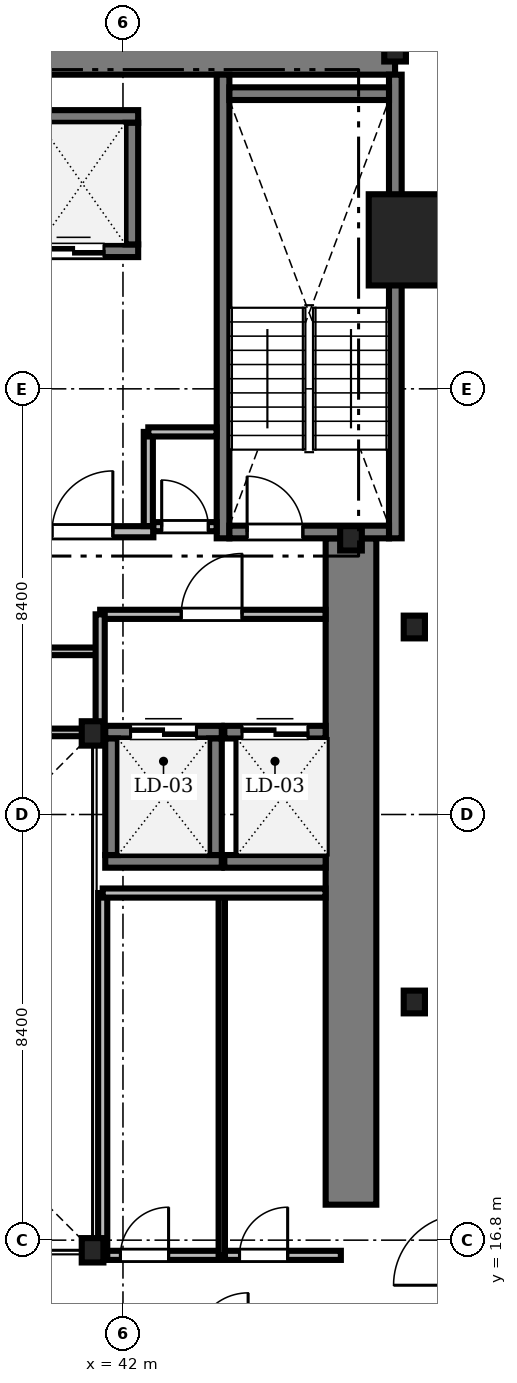
"""IFC4 building model, lengths in metres.
Left out: names, types, materials, properties, quantities, classifications, styles, units other than length and angle.
Written with IfcOpenShell. Run it as: python <this file> out.ifc"""

import sys

from ifc_helpers import new_model, si_unit, direction, frame, frame_2d, origin, origin_2d, place, context, subcontext, project, spatial, rectangle, i_section, extrude, source, transform, mapped, element, fill, save


model = new_model("IFC4")
c1 = context("Model", 3, precision=1e-05, world=origin(), true_north=direction((0.0, 1.0)))
c2 = subcontext(c1, "Body", "Model", "MODEL_VIEW")
j1 = project(units=[si_unit("LENGTHUNIT", "METRE"), si_unit("PLANEANGLEUNIT", "RADIAN")], contexts=[c1])
p1 = place(None, origin())
s1 = spatial("IfcSite", under=j1, at=p1, CompositionType="ELEMENT")
p2 = place(p1, origin())
s2 = spatial("IfcBuilding", under=s1, at=p2, CompositionType="ELEMENT")
p3 = place(p2, frame((0.0, 0.0, 67.75)))
s3 = spatial("IfcBuildingStorey", under=s2, at=p3, CompositionType="ELEMENT", Elevation=67.75)
m1 = source(origin(), c2, "Body", "SweptSolid", [
    extrude(rectangle(XDim=17.52, YDim=1.0, at=frame_2d((8.76, 0.0))), origin(), (0.0, 0.0, 1.0), 3.41),
])
p4 = place(p3, frame((29.85, 40.3, 0.0), z_axis=(0.0, 0.0, 1.0), x_axis=(1.0, 0.0, 0.0)))
e1 = element("IfcWall", 1, at=p4, inside=s3, PredefinedType="SHEAR", context=c2, shape_type="MappedRepresentation", body=[
    mapped(m1, transform((0.0, 0.0, 0.0), scale=1.0)),
])
m2 = source(origin(), c2, "Body", "SweptSolid", [
    extrude(rectangle(XDim=13.15, YDim=1.0, at=frame_2d((6.575, 0.0))), origin(), (0.0, 0.0, 1.0), 3.41),
])
p5 = place(p3, frame((46.5, 17.5, 0.0), z_axis=(0.0, 0.0, 1.0), x_axis=(0.0, 1.0, 0.0)))
e2 = element("IfcWall", 2, at=p5, inside=s3, PredefinedType="SHEAR", context=c2, shape_type="MappedRepresentation", body=[
    mapped(m2, transform((0.0, 0.0, 0.0), scale=1.0)),
])
m3 = source(origin(), c2, "Body", "SweptSolid", [
    extrude(i_section(OverallWidth=0.428, OverallDepth=0.481, WebThickness=0.04, FlangeThickness=0.063, FilletRadius=0.015, at=origin_2d()), origin(), (0.0, 0.0, 1.0), 3.41),
])
for number, where, z_axis, x_axis in (
    (3, (41.4, 16.6, 0.0), (0.0, 0.0, 1.0), (1.0, 0.0, 0.0)),
    (4, (41.4, 26.8, 0.0), (0.0, 0.0, 1.0), (1.0, 0.0, 0.0)),
    (5, (46.5, 30.65, 0.0), (0.0, 0.0, 1.0), (1.0, 0.0, 0.0)),
    (6, (47.37, 40.3, 0.0), (0.0, 0.0, 1.0), (1.0, 0.0, 0.0)),
):
    element("IfcColumn", number, at=place(p3, frame(where, z_axis=z_axis, x_axis=x_axis)), inside=s3, PredefinedType="COLUMN", context=c2, shape_type="MappedRepresentation", body=[
        mapped(m3, transform((0.0, 0.0, 0.0), scale=1.0)),
    ])
m4 = source(origin(), c2, "Body", "SweptSolid", [
    extrude(rectangle(XDim=1.8, YDim=1.8, at=origin_2d()), origin(), (0.0, 0.0, 1.0), 3.41),
])
p6 = place(p3, frame((47.75, 36.54, 0.0), z_axis=(0.0, 0.0, 1.0), x_axis=(1.0, 0.0, 0.0)))
e7 = element("IfcColumn", 7, at=p6, inside=s3, PredefinedType="COLUMN", context=c2, shape_type="MappedRepresentation", body=[
    mapped(m4, transform((0.0, 0.0, 0.0), scale=1.0)),
])
m5 = source(origin(), c2, "Body", "SweptSolid", [
    extrude(i_section(OverallWidth=0.419, OverallDepth=0.449, WebThickness=0.031, FlangeThickness=0.048, FilletRadius=0.015, at=origin_2d()), origin(), (0.0, 0.0, 1.0), 3.41),
])
for number, where, z_axis, x_axis in (
    (8, (47.75, 21.5, 0.0), (0.0, 0.0, 1.0), (1.0, 0.0, 0.0)),
    (9, (47.75, 28.9, 0.0), (0.0, 0.0, 1.0), (1.0, 0.0, 0.0)),
):
    element("IfcColumn", number, at=place(p3, frame(where, z_axis=z_axis, x_axis=x_axis)), inside=s3, PredefinedType="COLUMN", context=c2, shape_type="MappedRepresentation", body=[
        mapped(m5, transform((0.0, 0.0, 0.0), scale=1.0)),
    ])
m6 = source(origin(), c2, "Body", "SweptSolid", [
    extrude(rectangle(XDim=9.15, YDim=0.25, at=frame_2d((4.575, 0.0))), origin(), (0.0, 0.0, 1.0), 3.45),
])
for number, where, z_axis, x_axis in (
    (10, (43.975, 30.65, 0.0), (0.0, 0.0, 1.0), (0.0, 1.0, 0.0)),
    (11, (47.375, 30.65, 0.0), (0.0, 0.0, 1.0), (0.0, 1.0, 0.0)),
):
    element("IfcWall", number, at=place(p3, frame(where, z_axis=z_axis, x_axis=x_axis)), inside=s3, PredefinedType="SOLIDWALL", context=c2, shape_type="MappedRepresentation", body=[
        mapped(m6, transform((0.0, 0.0, 0.0), scale=1.0)),
    ])
m7 = source(origin(), c2, "Body", "SweptSolid", [
    extrude(rectangle(XDim=3.15, YDim=0.25, at=frame_2d((1.575, 0.0))), origin(), (0.0, 0.0, 1.0), 3.45),
])
p7 = place(p3, frame((44.1, 39.425, 0.0), z_axis=(0.0, 0.0, 1.0), x_axis=(1.0, 0.0, 0.0)))
e12 = element("IfcWall", 12, at=p7, inside=s3, PredefinedType="SOLIDWALL", context=c2, shape_type="MappedRepresentation", body=[
    mapped(m7, transform((0.0, 0.0, 0.0), scale=1.0)),
])
p8 = place(p3, frame((44.1, 30.775, 0.0), z_axis=(0.0, 0.0, 1.0), x_axis=(1.0, 0.0, 0.0)))
e13 = element("IfcWall", 13, at=p8, inside=s3, PredefinedType="SOLIDWALL", context=c2, shape_type="MappedRepresentation", body=[
    mapped(m7, transform((0.0, 0.0, 0.0), scale=1.0)),
])
m8 = source(origin(), c2, "Body", "SweptSolid", [
    extrude(rectangle(XDim=1.1, YDim=2.2, at=frame_2d((0.55, 1.1))), frame((0.0, 0.135, 0.0), z_axis=(0.0, -1.0, 0.0), x_axis=(1.0, 0.0, 0.0)), (0.0, 0.0, 1.0), 0.27),
])
p9 = place(p8, frame((0.35, 0.0, 0.0)))
e14 = element("IfcOpeningElement", 14, at=p9, cuts=e13, PredefinedType="OPENING", context=c2, shape_type="MappedRepresentation", body=[
    mapped(m8, transform((0.0, 0.0, 0.0), scale=1.0)),
])
m9 = source(origin(), c2, "Body", "SweptSolid", [
    extrude(rectangle(XDim=2.8, YDim=0.22, at=frame_2d((1.4, 0.0))), origin(), (0.0, 0.0, 1.0), 3.41),
])
p10 = place(p3, frame((39.8, 30.78, 0.0), z_axis=(0.0, 0.0, 1.0), x_axis=(1.0, 0.0, 0.0)))
e15 = element("IfcWall", 15, at=p10, inside=s3, PredefinedType="SOLIDWALL", context=c2, shape_type="MappedRepresentation", body=[
    mapped(m9, transform((0.0, 0.0, 0.0), scale=1.0)),
])
m10 = source(origin(), c2, "Body", "SweptSolid", [
    extrude(rectangle(XDim=1.2, YDim=2.2, at=frame_2d((0.6, 1.1))), frame((0.0, 0.12, 0.0), z_axis=(0.0, -1.0, 0.0), x_axis=(1.0, 0.0, 0.0)), (0.0, 0.0, 1.0), 0.24),
])
p11 = place(p10, frame((0.8, 0.0, 0.0)))
e16 = element("IfcOpeningElement", 16, at=p11, cuts=e15, PredefinedType="OPENING", context=c2, shape_type="MappedRepresentation", body=[
    mapped(m10, transform((0.0, 0.0, 0.0), scale=1.0)),
])
m11 = source(origin(), c2, "Body", "SweptSolid", [
    extrude(rectangle(XDim=2.55, YDim=0.25, at=frame_2d((1.275, 0.0))), origin(), (0.0, 0.0, 1.0), 3.41),
])
p12 = place(p3, frame((39.75, 36.325, 0.0), z_axis=(0.0, 0.0, 1.0), x_axis=(1.0, 0.0, 0.0)))
e17 = element("IfcWall", 17, at=p12, inside=s3, PredefinedType="SOLIDWALL", context=c2, shape_type="MappedRepresentation", body=[
    mapped(m11, transform((0.0, 0.0, 0.0), scale=1.0)),
])
m12 = source(origin(), c2, "Body", "SweptSolid", [
    extrude(rectangle(XDim=1.2, YDim=2.25, at=frame_2d((0.6, 1.125))), frame((0.0, 0.135, 0.0), z_axis=(0.0, -1.0, 0.0), x_axis=(1.0, 0.0, 0.0)), (0.0, 0.0, 1.0), 0.27),
])
p13 = place(p12, frame((0.675, 0.0, 0.0)))
e18 = element("IfcOpeningElement", 18, at=p13, cuts=e17, PredefinedType="OPENING", context=c2, shape_type="MappedRepresentation", body=[
    mapped(m12, transform((0.0, 0.0, 0.0), scale=1.0)),
])
p14 = place(p3, frame((39.75, 38.975, 0.0), z_axis=(0.0, 0.0, 1.0), x_axis=(1.0, 0.0, 0.0)))
e19 = element("IfcWall", 19, at=p14, inside=s3, PredefinedType="SOLIDWALL", context=c2, shape_type="MappedRepresentation", body=[
    mapped(m11, transform((0.0, 0.0, 0.0), scale=1.0)),
])
m13 = source(origin(), c2, "Body", "SweptSolid", [
    extrude(rectangle(XDim=2.4, YDim=0.25, at=frame_2d((1.2, 0.0))), origin(), (0.0, 0.0, 1.0), 3.41),
])
p15 = place(p3, frame((42.175, 36.45, 0.0), z_axis=(0.0, 0.0, 1.0), x_axis=(0.0, 1.0, 0.0)))
e20 = element("IfcWall", 20, at=p15, inside=s3, PredefinedType="SOLIDWALL", context=c2, shape_type="MappedRepresentation", body=[
    mapped(m13, transform((0.0, 0.0, 0.0), scale=1.0)),
])
m14 = source(origin(), c2, "Body", "SweptSolid", [
    extrude(rectangle(XDim=2.3, YDim=0.25, at=frame_2d((1.15, 0.0))), origin(), (0.0, 0.0, 1.0), 3.41),
])
p16 = place(p3, frame((41.65, 24.275, 0.0), z_axis=(0.0, 0.0, 1.0), x_axis=(1.0, 0.0, 0.0)))
e21 = element("IfcWall", 21, at=p16, inside=s3, PredefinedType="SOLIDWALL", context=c2, shape_type="MappedRepresentation", body=[
    mapped(m14, transform((0.0, 0.0, 0.0), scale=1.0)),
])
p17 = place(p3, frame((41.65, 26.825, 0.0), z_axis=(0.0, 0.0, 1.0), x_axis=(1.0, 0.0, 0.0)))
e22 = element("IfcWall", 22, at=p17, inside=s3, PredefinedType="SOLIDWALL", context=c2, shape_type="MappedRepresentation", body=[
    mapped(m14, transform((0.0, 0.0, 0.0), scale=1.0)),
])
m15 = source(origin(), c2, "Body", "SweptSolid", [
    extrude(rectangle(XDim=1.3, YDim=2.3, at=frame_2d((0.65, 1.15))), frame((0.0, 0.135, 0.0), z_axis=(0.0, -1.0, 0.0), x_axis=(1.0, 0.0, 0.0)), (0.0, 0.0, 1.0), 0.27),
])
p18 = place(p17, frame((0.5, 0.0, 0.0)))
e23 = element("IfcOpeningElement", 23, at=p18, cuts=e22, PredefinedType="OPENING", context=c2, shape_type="MappedRepresentation", body=[
    mapped(m15, transform((0.0, 0.0, 0.0), scale=1.0)),
])
for number, where, z_axis, x_axis in (
    (24, (41.775, 24.4, 0.0), (0.0, 0.0, 1.0), (0.0, 1.0, 0.0)),
    (25, (43.825, 24.4, 0.0), (0.0, 0.0, 1.0), (0.0, 1.0, 0.0)),
):
    element("IfcWall", number, at=place(p3, frame(where, z_axis=z_axis, x_axis=x_axis)), inside=s3, PredefinedType="SOLIDWALL", context=c2, shape_type="MappedRepresentation", body=[
        mapped(m14, transform((0.0, 0.0, 0.0), scale=1.0)),
    ])
m16 = source(origin(), c2, "Body", "SweptSolid", [
    extrude(rectangle(XDim=2.0, YDim=0.25, at=frame_2d((1.0, 0.0))), origin(), (0.0, 0.0, 1.0), 3.41),
])
p19 = place(p3, frame((44.0, 24.275, 0.0), z_axis=(0.0, 0.0, 1.0), x_axis=(1.0, 0.0, 0.0)))
e26 = element("IfcWall", 26, at=p19, inside=s3, PredefinedType="SOLIDWALL", context=c2, shape_type="MappedRepresentation", body=[
    mapped(m16, transform((0.0, 0.0, 0.0), scale=1.0)),
])
p20 = place(p3, frame((44.0, 26.825, 0.0), z_axis=(0.0, 0.0, 1.0), x_axis=(1.0, 0.0, 0.0)))
e27 = element("IfcWall", 27, at=p20, inside=s3, PredefinedType="SOLIDWALL", context=c2, shape_type="MappedRepresentation", body=[
    mapped(m16, transform((0.0, 0.0, 0.0), scale=1.0)),
])
p21 = place(p20, frame((0.35, 0.0, 0.0)))
e28 = element("IfcOpeningElement", 28, at=p21, cuts=e27, PredefinedType="OPENING", context=c2, shape_type="MappedRepresentation", body=[
    mapped(m15, transform((0.0, 0.0, 0.0), scale=1.0)),
])
m17 = source(origin(), c2, "Body", "SweptSolid", [
    extrude(rectangle(XDim=4.448, YDim=0.18, at=frame_2d((2.224, 0.0))), origin(), (0.0, 0.0, 1.0), 3.042),
])
p22 = place(p3, frame((41.55, 29.15, 0.0), z_axis=(0.0, 0.0, 1.0), x_axis=(1.0, 0.0, 0.0)))
e29 = element("IfcWall", 29, at=p22, inside=s3, PredefinedType="PARTITIONING", context=c2, shape_type="MappedRepresentation", body=[
    mapped(m17, transform((0.0, 0.0, 0.0), scale=1.0)),
])
m18 = source(origin(), c2, "Body", "SweptSolid", [
    extrude(rectangle(XDim=1.2, YDim=2.2, at=frame_2d((0.6, 1.1))), frame((0.0, 0.1, 0.0), z_axis=(0.0, -1.0, 0.0), x_axis=(1.0, 0.0, 0.0)), (0.0, 0.0, 1.0), 0.2),
])
p23 = place(p22, frame((1.6, 0.0, 0.0)))
e30 = element("IfcOpeningElement", 30, at=p23, cuts=e29, PredefinedType="OPENING", context=c2, shape_type="MappedRepresentation", body=[
    mapped(m18, transform((0.0, 0.0, 0.0), scale=1.0)),
])
m19 = source(origin(), c2, "Body", "SweptSolid", [
    extrude(rectangle(XDim=4.7, YDim=0.18, at=frame_2d((2.35, 0.0))), origin(), (0.0, 0.0, 1.0), 2.802),
])
p24 = place(p3, frame((41.6, 16.5, 0.0), z_axis=(0.0, 0.0, 1.0), x_axis=(1.0, 0.0, 0.0)))
e31 = element("IfcWall", 31, at=p24, inside=s3, PredefinedType="PARTITIONING", context=c2, shape_type="MappedRepresentation", body=[
    mapped(m19, transform((0.0, 0.0, 0.0), scale=1.0)),
])
m20 = source(origin(), c2, "Body", "SweptSolid", [
    extrude(rectangle(XDim=0.95, YDim=2.15, at=frame_2d((0.475, 1.075))), frame((0.0, 0.1, 0.0), z_axis=(0.0, -1.0, 0.0), x_axis=(1.0, 0.0, 0.0)), (0.0, 0.0, 1.0), 0.2),
])
p25 = place(p24, frame((0.35, 0.0, 0.0)))
e32 = element("IfcOpeningElement", 32, at=p25, cuts=e31, PredefinedType="OPENING", context=c2, shape_type="MappedRepresentation", body=[
    mapped(m20, transform((0.0, 0.0, 0.0), scale=1.0)),
])
p26 = place(p24, frame((2.7, 0.0, 0.0)))
e33 = element("IfcOpeningElement", 33, at=p26, cuts=e31, PredefinedType="OPENING", context=c2, shape_type="MappedRepresentation", body=[
    mapped(m20, transform((0.0, 0.0, 0.0), scale=1.0)),
])
m21 = source(origin(), c2, "Body", "SweptSolid", [
    extrude(rectangle(XDim=3.0, YDim=0.15, at=frame_2d((1.5, 0.0))), origin(), (0.0, 0.0, 1.0), 3.41),
])
p27 = place(p3, frame((38.52, 28.42, 0.0), z_axis=(0.0, 0.0, 1.0), x_axis=(1.0, 0.0, 0.0)))
e34 = element("IfcWall", 34, at=p27, inside=s3, PredefinedType="PARTITIONING", context=c2, shape_type="MappedRepresentation", body=[
    mapped(m21, transform((0.0, 0.0, 0.0), scale=1.0)),
])
m22 = source(origin(), c2, "Body", "SweptSolid", [
    extrude(rectangle(XDim=0.92, YDim=2.1, at=frame_2d((0.46, 1.05))), frame((0.0, 0.085, 0.0), z_axis=(0.0, -1.0, 0.0), x_axis=(1.0, 0.0, 0.0)), (0.0, 0.0, 1.0), 0.17),
])
p28 = place(p27, frame((0.83, 0.0, 0.0)))
e35 = element("IfcOpeningElement", 35, at=p28, cuts=e34, PredefinedType="OPENING", context=c2, shape_type="MappedRepresentation", body=[
    mapped(m22, transform((0.0, 0.0, 0.0), scale=1.0)),
])
m23 = source(origin(), c2, "Body", "SweptSolid", [
    extrude(rectangle(XDim=1.248, YDim=0.18, at=frame_2d((0.624, 0.0))), origin(), (0.0, 0.0, 1.0), 3.41),
])
p29 = place(p3, frame((42.6, 30.88, 0.0), z_axis=(0.0, 0.0, 1.0), x_axis=(1.0, 0.0, 0.0)))
e36 = element("IfcWall", 36, at=p29, inside=s3, PredefinedType="PARTITIONING", context=c2, shape_type="MappedRepresentation", body=[
    mapped(m23, transform((0.0, 0.0, 0.0), scale=1.0)),
])
m24 = source(origin(), c2, "Body", "SweptSolid", [
    extrude(rectangle(XDim=0.92, YDim=2.1, at=frame_2d((0.46, 1.05))), frame((0.0, 0.1, 0.0), z_axis=(0.0, -1.0, 0.0), x_axis=(1.0, 0.0, 0.0)), (0.0, 0.0, 1.0), 0.2),
])
p30 = place(p29, frame((0.164, 0.0, 0.0)))
e37 = element("IfcOpeningElement", 37, at=p30, cuts=e36, PredefinedType="OPENING", context=c2, shape_type="MappedRepresentation", body=[
    mapped(m24, transform((0.0, 0.0, 0.0), scale=1.0)),
])
m25 = source(origin(), c2, "Body", "SweptSolid", [
    extrude(rectangle(XDim=7.15, YDim=0.18, at=frame_2d((3.575, 0.0))), origin(), (0.0, 0.0, 1.0), 2.802),
])
p31 = place(p3, frame((41.6, 16.5, 0.0), z_axis=(0.0, 0.0, 1.0), x_axis=(0.0, 1.0, 0.0)))
e38 = element("IfcWall", 38, at=p31, inside=s3, PredefinedType="PARTITIONING", context=c2, shape_type="MappedRepresentation", body=[
    mapped(m25, transform((0.0, 0.0, 0.0), scale=1.0)),
])
m26 = source(origin(), c2, "Body", "SweptSolid", [
    extrude(rectangle(XDim=7.15, YDim=0.125, at=frame_2d((3.575, 0.0))), origin(), (0.0, 0.0, 1.0), 2.802),
])
p32 = place(p3, frame((43.95, 16.5, 0.0), z_axis=(0.0, 0.0, 1.0), x_axis=(0.0, 1.0, 0.0)))
e39 = element("IfcWall", 39, at=p32, inside=s3, PredefinedType="PARTITIONING", context=c2, shape_type="MappedRepresentation", body=[
    mapped(m26, transform((0.0, 0.0, 0.0), scale=1.0)),
])
m27 = source(origin(), c2, "Body", "SweptSolid", [
    extrude(rectangle(XDim=4.398, YDim=0.18, at=frame_2d((2.199, 0.0))), origin(), (0.0, 0.0, 1.0), 3.41),
])
p33 = place(p3, frame((41.6, 23.65, 0.0), z_axis=(0.0, 0.0, 1.0), x_axis=(1.0, 0.0, 0.0)))
e40 = element("IfcWall", 40, at=p33, inside=s3, PredefinedType="PARTITIONING", context=c2, shape_type="MappedRepresentation", body=[
    mapped(m27, transform((0.0, 0.0, 0.0), scale=1.0)),
])
m28 = source(origin(), c2, "Body", "SweptSolid", [
    extrude(rectangle(XDim=3.0, YDim=0.15, at=frame_2d((1.5, 0.0))), origin(), (0.0, 0.0, 1.0), 2.802),
])
p34 = place(p3, frame((38.52, 26.82, 0.0), z_axis=(0.0, 0.0, 1.0), x_axis=(1.0, 0.0, 0.0)))
e41 = element("IfcWall", 41, at=p34, inside=s3, PredefinedType="PARTITIONING", context=c2, shape_type="MappedRepresentation", body=[
    mapped(m28, transform((0.0, 0.0, 0.0), scale=1.0)),
])
m29 = source(origin(), c2, "Body", "SweptSolid", [
    extrude(rectangle(XDim=2.35, YDim=0.18, at=frame_2d((1.175, 0.0))), origin(), (0.0, 0.0, 1.0), 2.802),
])
p35 = place(p3, frame((41.55, 26.8, 0.0), z_axis=(0.0, 0.0, 1.0), x_axis=(0.0, 1.0, 0.0)))
e42 = element("IfcWall", 42, at=p35, inside=s3, PredefinedType="PARTITIONING", context=c2, shape_type="MappedRepresentation", body=[
    mapped(m29, transform((0.0, 0.0, 0.0), scale=1.0)),
])
m30 = source(origin(), c2, "Body", "SweptSolid", [
    extrude(rectangle(XDim=1.858, YDim=0.18, at=frame_2d((0.929, 0.0))), origin(), (0.0, 0.0, 1.0), 3.41),
])
p36 = place(p3, frame((42.5, 30.892, 0.0), z_axis=(0.0, 0.0, 1.0), x_axis=(0.0, 1.0, 0.0)))
e43 = element("IfcWall", 43, at=p36, inside=s3, PredefinedType="PARTITIONING", context=c2, shape_type="MappedRepresentation", body=[
    mapped(m30, transform((0.0, 0.0, 0.0), scale=1.0)),
])
m31 = source(origin(), c2, "Body", "SweptSolid", [
    extrude(rectangle(XDim=1.348, YDim=0.18, at=frame_2d((0.674, 0.0))), origin(), (0.0, 0.0, 1.0), 3.41),
])
p37 = place(p3, frame((42.5, 32.75, 0.0), z_axis=(0.0, 0.0, 1.0), x_axis=(1.0, 0.0, 0.0)))
e44 = element("IfcWall", 44, at=p37, inside=s3, PredefinedType="PARTITIONING", context=c2, shape_type="MappedRepresentation", body=[
    mapped(m31, transform((0.0, 0.0, 0.0), scale=1.0)),
])
m32 = source(origin(), c2, "Body", "SweptSolid", [
    extrude(rectangle(XDim=1.1, YDim=2.2, at=frame_2d((0.55, 1.1))), frame((0.0, 0.025, 0.0), z_axis=(0.0, -1.0, 0.0), x_axis=(1.0, 0.0, 0.0)), (0.0, 0.0, 1.0), 0.05),
])
p38 = place(p9, origin())
e45 = element("IfcDoor", 45, at=p38, inside=s3, OperationType="SINGLE_SWING_LEFT", PredefinedType="DOOR", context=c2, shape_type="MappedRepresentation", body=[
    mapped(m32, transform((0.0, 0.0, 0.0), scale=1.0)),
])
fill(e14, e45)
m33 = source(origin(), c2, "Body", "SweptSolid", [
    extrude(rectangle(XDim=1.2, YDim=2.2, at=frame_2d((0.6, 1.1))), frame((0.0, 0.025, 0.0), z_axis=(0.0, -1.0, 0.0), x_axis=(1.0, 0.0, 0.0)), (0.0, 0.0, 1.0), 0.05),
])
p39 = place(p11, origin())
e46 = element("IfcDoor", 46, at=p39, inside=s3, OperationType="SINGLE_SWING_RIGHT", PredefinedType="DOOR", context=c2, shape_type="MappedRepresentation", body=[
    mapped(m33, transform((0.0, 0.0, 0.0), scale=1.0)),
])
fill(e16, e46)
m34 = source(origin(), c2, "Body", "SweptSolid", [
    extrude(rectangle(XDim=1.2, YDim=2.25, at=frame_2d((0.6, 1.125))), frame((0.0, 0.025, 0.0), z_axis=(0.0, -1.0, 0.0), x_axis=(1.0, 0.0, 0.0)), (0.0, 0.0, 1.0), 0.05),
])
p40 = place(p13, origin())
e47 = element("IfcDoor", 47, at=p40, inside=s3, OperationType="DOUBLE_DOOR_SLIDING", PredefinedType="DOOR", context=c2, shape_type="MappedRepresentation", body=[
    mapped(m34, transform((0.0, 0.0, 0.0), scale=1.0)),
])
fill(e18, e47)
m35 = source(origin(), c2, "Body", "SweptSolid", [
    extrude(rectangle(XDim=1.3, YDim=2.3, at=frame_2d((0.65, 1.15))), frame((0.0, 0.025, 0.0), z_axis=(0.0, -1.0, 0.0), x_axis=(1.0, 0.0, 0.0)), (0.0, 0.0, 1.0), 0.05),
])
p41 = place(p18, origin())
e48 = element("IfcDoor", 48, at=p41, inside=s3, OperationType="DOUBLE_DOOR_SLIDING", PredefinedType="DOOR", context=c2, shape_type="MappedRepresentation", body=[
    mapped(m35, transform((0.0, 0.0, 0.0), scale=1.0)),
])
fill(e23, e48)
p42 = place(p21, origin())
e49 = element("IfcDoor", 49, at=p42, inside=s3, OperationType="DOUBLE_DOOR_SLIDING", PredefinedType="DOOR", context=c2, shape_type="MappedRepresentation", body=[
    mapped(m35, transform((0.0, 0.0, 0.0), scale=1.0)),
])
fill(e28, e49)
p43 = place(p23, origin())
e50 = element("IfcDoor", 50, at=p43, inside=s3, OperationType="SINGLE_SWING_RIGHT", PredefinedType="DOOR", context=c2, shape_type="MappedRepresentation", body=[
    mapped(m33, transform((0.0, 0.0, 0.0), scale=1.0)),
])
fill(e30, e50)
m36 = source(origin(), c2, "Body", "SweptSolid", [
    extrude(rectangle(XDim=0.95, YDim=2.15, at=frame_2d((0.475, 1.075))), frame((0.0, 0.025, 0.0), z_axis=(0.0, -1.0, 0.0), x_axis=(1.0, 0.0, 0.0)), (0.0, 0.0, 1.0), 0.05),
])
p44 = place(p25, origin())
e51 = element("IfcDoor", 51, at=p44, inside=s3, OperationType="SINGLE_SWING_RIGHT", PredefinedType="DOOR", context=c2, shape_type="MappedRepresentation", body=[
    mapped(m36, transform((0.0, 0.0, 0.0), scale=1.0)),
])
fill(e32, e51)
p45 = place(p26, origin())
e52 = element("IfcDoor", 52, at=p45, inside=s3, OperationType="SINGLE_SWING_RIGHT", PredefinedType="DOOR", context=c2, shape_type="MappedRepresentation", body=[
    mapped(m36, transform((0.0, 0.0, 0.0), scale=1.0)),
])
fill(e33, e52)
m37 = source(origin(), c2, "Body", "SweptSolid", [
    extrude(rectangle(XDim=0.92, YDim=2.1, at=frame_2d((0.46, 1.05))), frame((0.0, 0.025, 0.0), z_axis=(0.0, -1.0, 0.0), x_axis=(1.0, 0.0, 0.0)), (0.0, 0.0, 1.0), 0.05),
])
p46 = place(p30, origin())
e53 = element("IfcDoor", 53, at=p46, inside=s3, OperationType="SINGLE_SWING_LEFT", PredefinedType="DOOR", context=c2, shape_type="MappedRepresentation", body=[
    mapped(m37, transform((0.0, 0.0, 0.0), scale=1.0)),
])
fill(e37, e53)
save(model, sys.argv[1])
